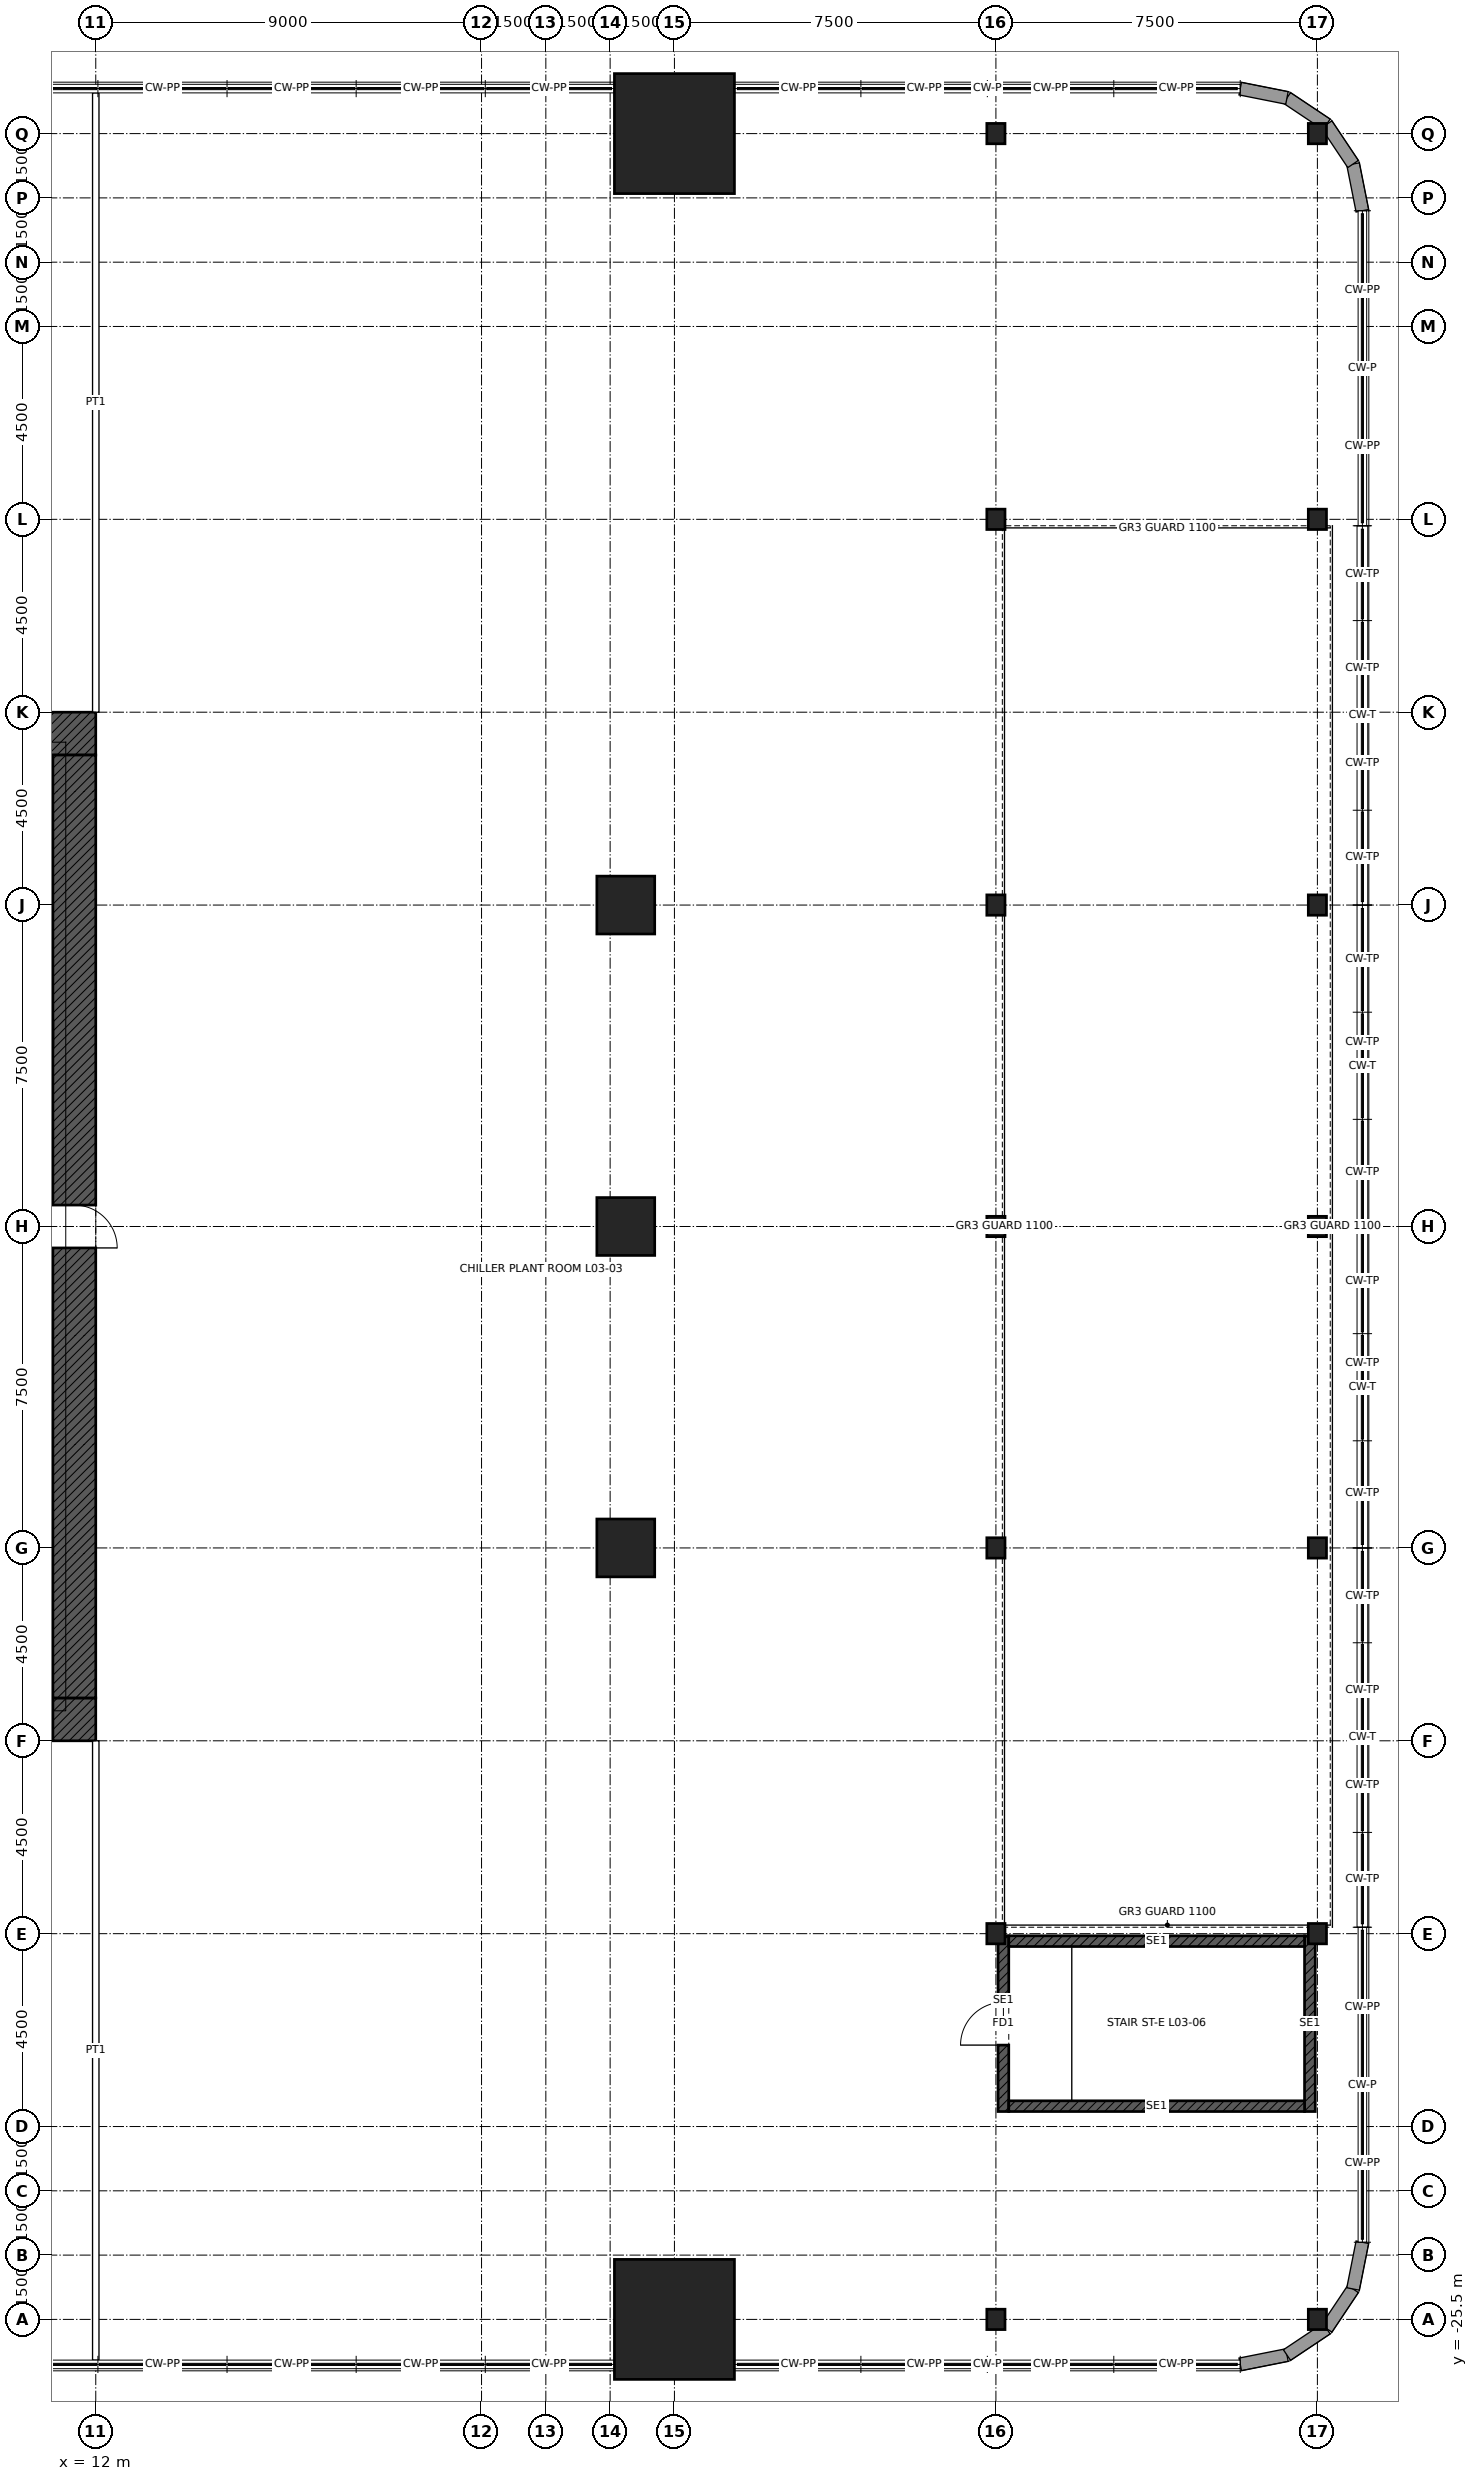
"""IFC4 building model, lengths in metres.
Left out: names, types, materials, properties, quantities, classifications, styles, units other than length and angle.
Written with IfcOpenShell. Run it as: python <this file> out.ifc"""

import sys

from ifc_helpers import new_model, si_unit, direction, frame, frame_2d, origin, origin_2d, place, context, subcontext, project, spatial, rectangle, hollow_rectangle, i_section, extrude, element, fill, save


model = new_model("IFC4")
c1 = context("Model", 3, precision=1e-05, world=origin(), true_north=direction((0.0, 1.0)))
c2 = subcontext(c1, "Body", "Model", "MODEL_VIEW")
j1 = project(units=[si_unit("LENGTHUNIT", "METRE"), si_unit("PLANEANGLEUNIT", "RADIAN")], contexts=[c1])
p1 = place(None, origin())
s1 = spatial("IfcSite", under=j1, at=p1, CompositionType="ELEMENT")
p2 = place(p1, origin())
s2 = spatial("IfcBuilding", under=s1, at=p2, CompositionType="ELEMENT")
p3 = place(p2, frame((0.0, 0.0, 18.0)))
s3 = spatial("IfcBuildingStorey", under=s2, at=p3, CompositionType="ELEMENT", Elevation=18.0)
for number, where, z_axis, x_axis in (
    (1, (25.5, 25.5, 0.0), (0.0, 0.0, 1.0), (1.0, 0.0, 0.0)),
    (2, (25.5, -25.5, 0.0), (0.0, 0.0, 1.0), (1.0, 0.0, 0.0)),
):
    element("IfcColumn", number, at=place(p3, frame(where, z_axis=z_axis, x_axis=x_axis)), inside=s3, PredefinedType="COLUMN", context=c2, shape_type="SweptSolid", body=[
        extrude(hollow_rectangle(XDim=2.8, YDim=2.8, WallThickness=0.14, at=origin_2d()), origin(), (0.0, 0.0, 1.0), 5.4),
    ])
for number, where, z_axis, x_axis in (
    (3, (24.365, 7.5, 0.0), (0.0, 0.0, 1.0), (1.0, 0.0, 0.0)),
    (4, (24.365, 0.0, 0.0), (0.0, 0.0, 1.0), (1.0, 0.0, 0.0)),
    (5, (24.365, -7.5, 0.0), (0.0, 0.0, 1.0), (1.0, 0.0, 0.0)),
):
    element("IfcColumn", number, at=place(p3, frame(where, z_axis=z_axis, x_axis=x_axis)), inside=s3, PredefinedType="COLUMN", context=c2, shape_type="SweptSolid", body=[
        extrude(hollow_rectangle(XDim=1.35, YDim=1.35, WallThickness=0.1, at=origin_2d()), origin(), (0.0, 0.0, 1.0), 5.4),
    ])
for number, where, z_axis, x_axis in (
    (6, (33.0, -25.5, 0.0), (0.0, 0.0, 1.0), (1.0, 0.0, 0.0)),
    (7, (33.0, -16.5, 0.0), (0.0, 0.0, 1.0), (1.0, 0.0, 0.0)),
    (8, (33.0, -7.5, 0.0), (0.0, 0.0, 1.0), (1.0, 0.0, 0.0)),
    (9, (33.0, 0.0, 0.0), (0.0, 0.0, 1.0), (1.0, 0.0, 0.0)),
    (10, (33.0, 7.5, 0.0), (0.0, 0.0, 1.0), (1.0, 0.0, 0.0)),
    (11, (33.0, 16.5, 0.0), (0.0, 0.0, 1.0), (1.0, 0.0, 0.0)),
    (12, (33.0, 25.5, 0.0), (0.0, 0.0, 1.0), (1.0, 0.0, 0.0)),
    (13, (40.5, -25.5, 0.0), (0.0, 0.0, 1.0), (1.0, 0.0, 0.0)),
    (14, (40.5, -16.5, 0.0), (0.0, 0.0, 1.0), (1.0, 0.0, 0.0)),
    (15, (40.5, -7.5, 0.0), (0.0, 0.0, 1.0), (1.0, 0.0, 0.0)),
    (16, (40.5, 0.0, 0.0), (0.0, 0.0, 1.0), (1.0, 0.0, 0.0)),
    (17, (40.5, 7.5, 0.0), (0.0, 0.0, 1.0), (1.0, 0.0, 0.0)),
    (18, (40.5, 16.5, 0.0), (0.0, 0.0, 1.0), (1.0, 0.0, 0.0)),
    (19, (40.5, 25.5, 0.0), (0.0, 0.0, 1.0), (1.0, 0.0, 0.0)),
):
    element("IfcColumn", number, at=place(p3, frame(where, z_axis=z_axis, x_axis=x_axis)), inside=s3, PredefinedType="COLUMN", context=c2, shape_type="SweptSolid", body=[
        extrude(i_section(OverallWidth=0.424, OverallDepth=0.475, WebThickness=0.048, FlangeThickness=0.077, at=origin_2d()), origin(), (0.0, 0.0, 1.0), 5.4),
    ])
p4 = place(p3, frame((-12.0, 11.5, 0.0), z_axis=(0.0, 0.0, 1.0), x_axis=(1.0, 0.0, 0.0)))
e20 = element("IfcWall", 20, at=p4, inside=s3, PredefinedType="SHEAR", context=c2, shape_type="SweptSolid", body=[
    extrude(rectangle(XDim=24.0, YDim=1.0, at=frame_2d((12.0, 0.0))), origin(), (0.0, 0.0, 1.0), 5.4),
])
p5 = place(p4, frame((6.25, 0.0, 0.0)))
e21 = element("IfcOpeningElement", 21, at=p5, cuts=e20, PredefinedType="OPENING", context=c2, shape_type="SweptSolid", body=[
    extrude(rectangle(XDim=1.0, YDim=2.4, at=frame_2d((0.5, 1.2))), frame((0.0, 0.51, 0.0), z_axis=(0.0, -1.0, 0.0), x_axis=(1.0, 0.0, 0.0)), (0.0, 0.0, 1.0), 1.02),
])
p6 = place(p4, frame((16.75, 0.0, 0.0)))
e22 = element("IfcOpeningElement", 22, at=p6, cuts=e20, PredefinedType="OPENING", context=c2, shape_type="SweptSolid", body=[
    extrude(rectangle(XDim=1.0, YDim=2.4, at=frame_2d((0.5, 1.2))), frame((0.0, 0.51, 0.0), z_axis=(0.0, -1.0, 0.0), x_axis=(1.0, 0.0, 0.0)), (0.0, 0.0, 1.0), 1.02),
])
p7 = place(p3, frame((12.0, -11.5, 0.0), z_axis=(0.0, 0.0, 1.0), x_axis=(-1.0, 0.0, 0.0)))
e23 = element("IfcWall", 23, at=p7, inside=s3, PredefinedType="SHEAR", context=c2, shape_type="SweptSolid", body=[
    extrude(rectangle(XDim=24.0, YDim=1.0, at=frame_2d((12.0, 0.0))), origin(), (0.0, 0.0, 1.0), 5.4),
])
p8 = place(p7, frame((11.5, 0.0, 0.0)))
e24 = element("IfcOpeningElement", 24, at=p8, cuts=e23, PredefinedType="OPENING", context=c2, shape_type="SweptSolid", body=[
    extrude(rectangle(XDim=1.0, YDim=2.1, at=frame_2d((0.5, 1.05))), frame((0.0, 0.51, 0.0), z_axis=(0.0, -1.0, 0.0), x_axis=(1.0, 0.0, 0.0)), (0.0, 0.0, 1.0), 1.02),
])
p9 = place(p7, frame((1.0, 0.0, 0.0)))
e25 = element("IfcOpeningElement", 25, at=p9, cuts=e23, PredefinedType="OPENING", context=c2, shape_type="SweptSolid", body=[
    extrude(rectangle(XDim=1.0, YDim=2.4, at=frame_2d((0.5, 1.2))), frame((0.0, 0.51, 0.0), z_axis=(0.0, -1.0, 0.0), x_axis=(1.0, 0.0, 0.0)), (0.0, 0.0, 1.0), 1.02),
])
p10 = place(p3, frame((11.5, 11.0, 0.0), z_axis=(0.0, 0.0, 1.0), x_axis=(0.0, -1.0, 0.0)))
e26 = element("IfcWall", 26, at=p10, inside=s3, PredefinedType="SHEAR", context=c2, shape_type="SweptSolid", body=[
    extrude(rectangle(XDim=22.0, YDim=1.0, at=frame_2d((11.0, 0.0))), origin(), (0.0, 0.0, 1.0), 5.4),
])
p11 = place(p10, frame((10.5, 0.0, 0.0)))
e27 = element("IfcOpeningElement", 27, at=p11, cuts=e26, PredefinedType="OPENING", context=c2, shape_type="SweptSolid", body=[
    extrude(rectangle(XDim=1.0, YDim=2.4, at=frame_2d((0.5, 1.2))), frame((0.0, 0.51, 0.0), z_axis=(0.0, -1.0, 0.0), x_axis=(1.0, 0.0, 0.0)), (0.0, 0.0, 1.0), 1.02),
])
for number, where, z_axis, x_axis in (
    (28, (41.55, 23.7, 0.0), (0.0, 0.0, 1.0), (-0.195, 0.981, 0.0)),
    (29, (41.333, 24.791, 0.0), (0.0, 0.0, 1.0), (-0.555, 0.832, 0.0)),
    (30, (40.715, 25.715, 0.0), (0.0, 0.0, 1.0), (-0.832, 0.555, 0.0)),
    (31, (39.791, 26.333, 0.0), (0.0, 0.0, 1.0), (-0.981, 0.195, 0.0)),
    (32, (38.7, -26.55, 0.0), (0.0, 0.0, 1.0), (0.981, 0.195, 0.0)),
    (33, (39.791, -26.333, 0.0), (0.0, 0.0, 1.0), (0.832, 0.555, 0.0)),
    (34, (40.715, -25.715, 0.0), (0.0, 0.0, 1.0), (0.555, 0.832, 0.0)),
    (35, (41.333, -24.791, 0.0), (0.0, 0.0, 1.0), (0.195, 0.981, 0.0)),
):
    element("IfcWall", number, at=place(p3, frame(where, z_axis=z_axis, x_axis=x_axis)), inside=s3, PredefinedType="SOLIDWALL", context=c2, shape_type="SweptSolid", body=[
        extrude(rectangle(XDim=1.112, YDim=0.3, at=frame_2d((0.556, 0.0))), origin(), (0.0, 0.0, 1.0), 5.2),
    ])
p12 = place(p3, frame((12.0, 12.0, 0.0), z_axis=(0.0, 0.0, 1.0), x_axis=(0.0, 1.0, 0.0)))
e36 = element("IfcWall", 36, at=p12, inside=s3, PredefinedType="PARTITIONING", context=c2, shape_type="SweptSolid", body=[
    extrude(rectangle(XDim=14.45, YDim=0.15, at=frame_2d((7.225, 0.0))), origin(), (0.0, 0.0, 1.0), 5.2),
])
p13 = place(p3, frame((12.0, -12.0, 0.0), z_axis=(0.0, 0.0, 1.0), x_axis=(0.0, -1.0, 0.0)))
e37 = element("IfcWall", 37, at=p13, inside=s3, PredefinedType="PARTITIONING", context=c2, shape_type="SweptSolid", body=[
    extrude(rectangle(XDim=14.45, YDim=0.15, at=frame_2d((7.225, 0.0))), origin(), (0.0, 0.0, 1.0), 4.164),
])
p14 = place(p3, frame((33.175, -20.65, 0.0), z_axis=(0.0, 0.0, 1.0), x_axis=(0.0, 1.0, 0.0)))
e38 = element("IfcWall", 38, at=p14, inside=s3, PredefinedType="SOLIDWALL", context=c2, shape_type="SweptSolid", body=[
    extrude(rectangle(XDim=4.1, YDim=0.25, at=frame_2d((2.05, 0.0))), origin(), (0.0, 0.0, 1.0), 5.2),
])
p15 = place(p14, frame((1.55, 0.0, 0.0)))
e39 = element("IfcOpeningElement", 39, at=p15, cuts=e38, PredefinedType="OPENING", context=c2, shape_type="SweptSolid", body=[
    extrude(rectangle(XDim=1.0, YDim=2.1, at=frame_2d((0.5, 1.05))), frame((0.0, 0.135, 0.0), z_axis=(0.0, -1.0, 0.0), x_axis=(1.0, 0.0, 0.0)), (0.0, 0.0, 1.0), 0.27),
])
p16 = place(p3, frame((40.325, -20.65, 0.0), z_axis=(0.0, 0.0, 1.0), x_axis=(0.0, 1.0, 0.0)))
e40 = element("IfcWall", 40, at=p16, inside=s3, PredefinedType="SOLIDWALL", context=c2, shape_type="SweptSolid", body=[
    extrude(rectangle(XDim=4.1, YDim=0.25, at=frame_2d((2.05, 0.0))), origin(), (0.0, 0.0, 1.0), 5.2),
])
for number, where, z_axis, x_axis in (
    (41, (33.3, -20.525, 0.0), (0.0, 0.0, 1.0), (1.0, 0.0, 0.0)),
    (42, (33.3, -16.675, 0.0), (0.0, 0.0, 1.0), (1.0, 0.0, 0.0)),
):
    element("IfcWall", number, at=place(p3, frame(where, z_axis=z_axis, x_axis=x_axis)), inside=s3, PredefinedType="SOLIDWALL", context=c2, shape_type="SweptSolid", body=[
        extrude(rectangle(XDim=6.9, YDim=0.25, at=frame_2d((3.45, 0.0))), origin(), (0.0, 0.0, 1.0), 5.2),
    ])
p17 = place(p11, origin())
e43 = element("IfcDoor", 43, at=p17, inside=s3, OperationType="SINGLE_SWING_RIGHT", PredefinedType="DOOR", context=c2, shape_type="SweptSolid", body=[
    extrude(rectangle(XDim=1.0, YDim=2.4, at=frame_2d((0.5, 1.2))), frame((0.0, 0.485, 0.0), z_axis=(0.0, -1.0, 0.0), x_axis=(1.0, 0.0, 0.0)), (0.0, 0.0, 1.0), 0.05),
])
fill(e27, e43)
p18 = place(p15, origin())
e44 = element("IfcDoor", 44, at=p18, inside=s3, OperationType="SINGLE_SWING_LEFT", PredefinedType="DOOR", context=c2, shape_type="SweptSolid", body=[
    extrude(rectangle(XDim=1.0, YDim=2.1, at=frame_2d((0.5, 1.05))), frame((0.0, 0.025, 0.0), z_axis=(0.0, -1.0, 0.0), x_axis=(1.0, 0.0, 0.0)), (0.0, 0.0, 1.0), 0.05),
])
fill(e39, e44)
save(model, sys.argv[1])
